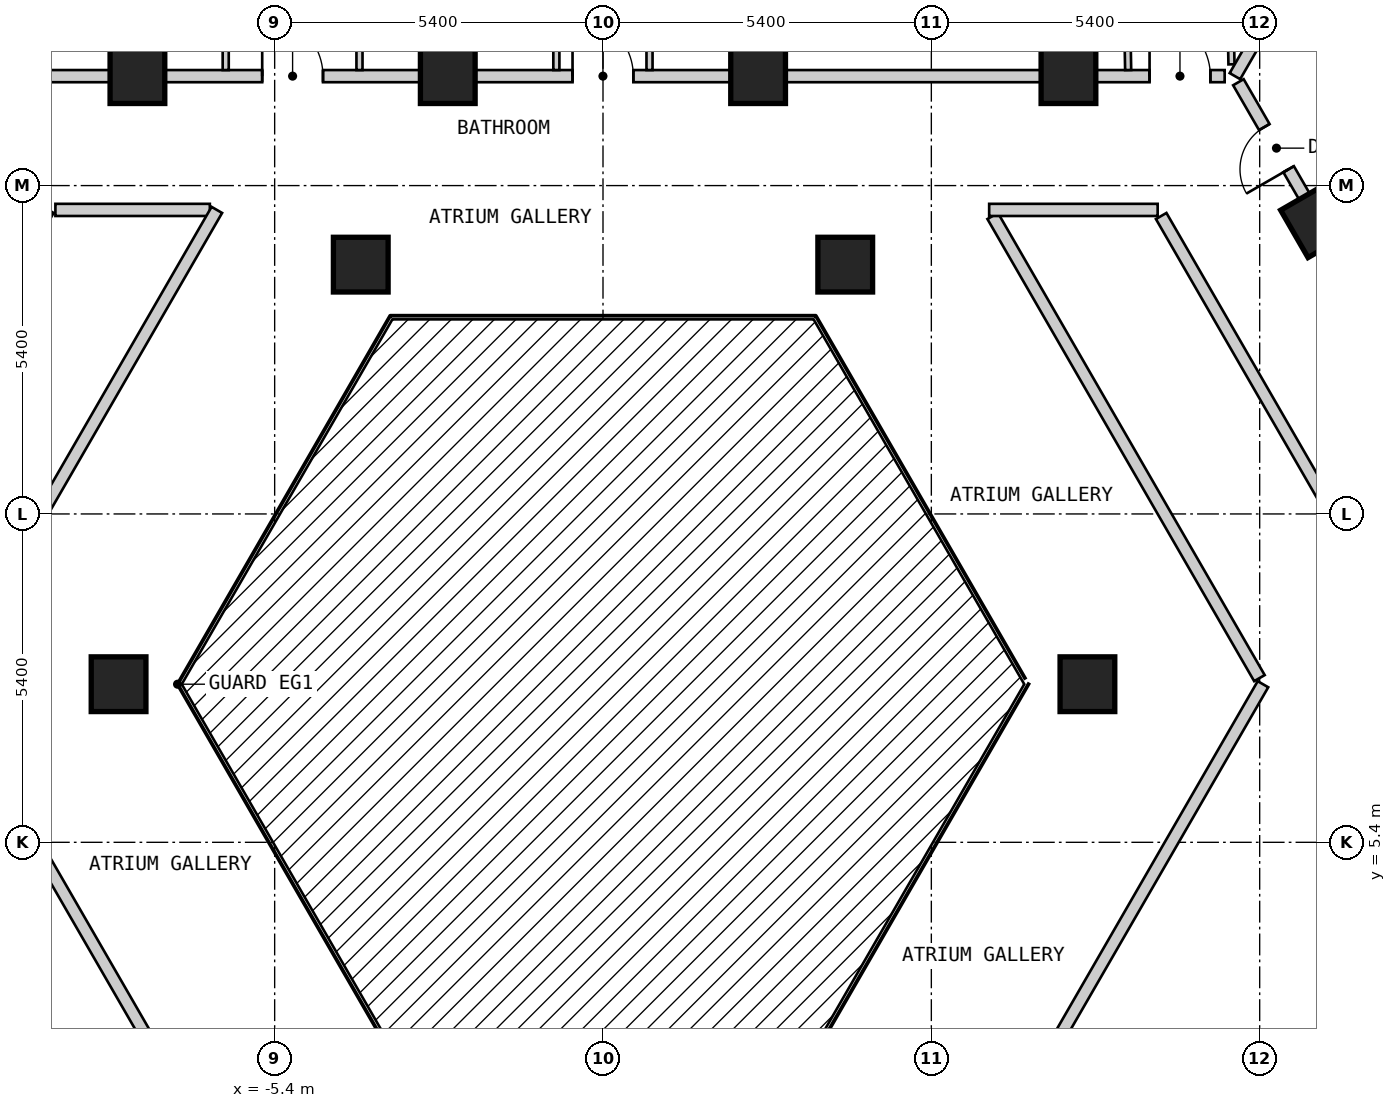
"""IFC4 building model, lengths in metres.
Left out: names, types, materials, properties, quantities, classifications, styles, units other than length and angle.
Written with IfcOpenShell. Run it as: python <this file> out.ifc"""

import sys

from ifc_helpers import new_model, si_unit, direction, frame, frame_2d, origin, origin_2d, place, context, subcontext, project, spatial, rectangle, extrude, element, fill, save


model = new_model("IFC4")
c1 = context("Model", 3, precision=1e-05, world=origin(), true_north=direction((0.0, 1.0)))
c2 = subcontext(c1, "Body", "Model", "MODEL_VIEW")
j1 = project(units=[si_unit("LENGTHUNIT", "METRE"), si_unit("PLANEANGLEUNIT", "RADIAN")], contexts=[c1])
p1 = place(None, origin())
s1 = spatial("IfcSite", under=j1, at=p1, CompositionType="ELEMENT")
p2 = place(p1, origin())
s2 = spatial("IfcBuilding", under=s1, at=p2, CompositionType="ELEMENT")
p3 = place(p2, frame((0.0, 0.0, 26.4)))
s3 = spatial("IfcBuildingStorey", under=s2, at=p3, CompositionType="ELEMENT", Elevation=26.4)
for number, where, z_axis, x_axis in (
    (1, (7.967, 8.0, 0.0), (0.0, 0.0, 1.0), (1.0, 0.0, 0.0)),
    (2, (11.76, 15.631, 0.0), (0.0, 0.0, 1.0), (-0.5, 0.866, 0.0)),
    (3, (7.655, 18.0, 0.0), (0.0, 0.0, 1.0), (-1.0, 0.0, 0.0)),
    (4, (3.984, 14.9, 0.0), (0.0, 0.0, 1.0), (1.0, 0.0, 0.0)),
    (5, (2.551, 18.0, 0.0), (0.0, 0.0, 1.0), (-1.0, 0.0, 0.0)),
    (6, (-2.553, 18.0, 0.0), (0.0, 0.0, 1.0), (-1.0, 0.0, 0.0)),
    (7, (-3.984, 14.9, 0.0), (0.0, 0.0, 1.0), (1.0, 0.0, 0.0)),
    (8, (-7.657, 18.0, 0.0), (0.0, 0.0, 1.0), (-1.0, 0.0, 0.0)),
    (9, (-7.967, 8.0, 0.0), (0.0, 0.0, 1.0), (1.0, 0.0, 0.0)),
):
    element("IfcColumn", number, at=place(p3, frame(where, z_axis=z_axis, x_axis=x_axis)), inside=s3, PredefinedType="COLUMN", context=c2, shape_type="SweptSolid", body=[
        extrude(rectangle(XDim=0.9, YDim=0.9, at=origin_2d()), origin(), (0.0, 0.0, 1.0), 3.0),
    ])
p4 = place(p3, frame((-10.796, 7.9, 0.0), z_axis=(0.0, 0.0, 1.0), x_axis=(0.499954271211, -0.866051803703, 0.0)))
e10 = element("IfcWall", 10, at=p4, inside=s3, PredefinedType="PARTITIONING", context=c2, shape_type="SweptSolid", body=[
    extrude(rectangle(XDim=7.536, YDim=0.2, at=frame_2d((3.768, 0.0))), origin(), (0.0, 0.0, 1.0), 2.7),
])
p5 = place(p3, frame((6.409, 15.7, 0.0), z_axis=(0.0, 0.0, 1.0), x_axis=(0.499930377127, -0.866065596838, 0.0)))
e11 = element("IfcWall", 11, at=p5, inside=s3, PredefinedType="PARTITIONING", context=c2, shape_type="SweptSolid", body=[
    extrude(rectangle(XDim=8.775, YDim=0.2, at=frame_2d((4.388, 0.0))), origin(), (0.0, 0.0, 1.0), 2.7),
])
p6 = place(p3, frame((9.18, 15.7, 0.0), z_axis=(0.0, 0.0, 1.0), x_axis=(0.500003652032, -0.866023295272, 0.0)))
e12 = element("IfcWall", 12, at=p6, inside=s3, PredefinedType="PARTITIONING", context=c2, shape_type="SweptSolid", body=[
    extrude(rectangle(XDim=18.012, YDim=0.2, at=frame_2d((9.006, 0.0))), origin(), (0.0, 0.0, 1.0), 2.7),
])
p7 = place(p6, frame((8.556, 0.0, 0.0)))
e13 = element("IfcOpeningElement", 13, at=p7, cuts=e12, PredefinedType="OPENING", context=c2, shape_type="SweptSolid", body=[
    extrude(rectangle(XDim=0.9, YDim=2.1, at=frame_2d((0.45, 1.05))), frame((0.0, 0.11, 0.0), z_axis=(0.0, -1.0, 0.0), x_axis=(1.0, 0.0, 0.0)), (0.0, 0.0, 1.0), 0.22),
])
p8 = place(p3, frame((10.45, 17.9, 0.0), z_axis=(0.0, 0.0, 1.0), x_axis=(0.500034352617, -0.866005569383, 0.0)))
e14 = element("IfcWall", 14, at=p8, inside=s3, PredefinedType="PARTITIONING", context=c2, shape_type="SweptSolid", body=[
    extrude(rectangle(XDim=20.553, YDim=0.2, at=frame_2d((10.276, 0.0))), origin(), (0.0, 0.0, 1.0), 2.7),
])
p9 = place(p8, frame((9.775, 0.0, 0.0)))
e15 = element("IfcOpeningElement", 15, at=p9, cuts=e14, PredefinedType="OPENING", context=c2, shape_type="SweptSolid", body=[
    extrude(rectangle(XDim=1.0, YDim=2.1, at=frame_2d((0.5, 1.05))), frame((0.0, 0.11, 0.0), z_axis=(0.0, -1.0, 0.0), x_axis=(1.0, 0.0, 0.0)), (0.0, 0.0, 1.0), 0.22),
])
p10 = place(p8, frame((0.852, 0.0, 0.0)))
e16 = element("IfcOpeningElement", 16, at=p10, cuts=e14, PredefinedType="OPENING", context=c2, shape_type="SweptSolid", body=[
    extrude(rectangle(XDim=0.8, YDim=2.1, at=frame_2d((0.4, 1.05))), frame((0.0, 0.11, 0.0), z_axis=(0.0, -1.0, 0.0), x_axis=(1.0, 0.0, 0.0)), (0.0, 0.0, 1.0), 0.22),
])
p11 = place(p3, frame((-9.006, 15.8, 0.0), z_axis=(0.0, 0.0, 1.0), x_axis=(1.0, 0.0, 0.0)))
e17 = element("IfcWall", 17, at=p11, inside=s3, PredefinedType="PARTITIONING", context=c2, shape_type="SweptSolid", body=[
    extrude(rectangle(XDim=2.54, YDim=0.2, at=frame_2d((1.27, 0.0))), origin(), (0.0, 0.0, 1.0), 2.7),
])
p12 = place(p3, frame((6.351, 15.8, 0.0), z_axis=(0.0, 0.0, 1.0), x_axis=(1.0, 0.0, 0.0)))
e18 = element("IfcWall", 18, at=p12, inside=s3, PredefinedType="PARTITIONING", context=c2, shape_type="SweptSolid", body=[
    extrude(rectangle(XDim=2.771, YDim=0.2, at=frame_2d((1.385, 0.0))), origin(), (0.0, 0.0, 1.0), 2.7),
])
p13 = place(p3, frame((-10.276, 18.0, 0.0), z_axis=(0.0, 0.0, 1.0), x_axis=(1.0, 0.0, 0.0)))
e19 = element("IfcWall", 19, at=p13, inside=s3, PredefinedType="PARTITIONING", context=c2, shape_type="SweptSolid", body=[
    extrude(rectangle(XDim=20.5, YDim=0.2, at=frame_2d((10.25, 0.0))), origin(), (0.0, 0.0, 1.0), 2.7),
])
p14 = place(p13, frame((19.265, 0.0, 0.0)))
e20 = element("IfcOpeningElement", 20, at=p14, cuts=e19, PredefinedType="OPENING", context=c2, shape_type="SweptSolid", body=[
    extrude(rectangle(XDim=1.0, YDim=2.1, at=frame_2d((0.5, 1.05))), frame((0.0, 0.11, 0.0), z_axis=(0.0, -1.0, 0.0), x_axis=(1.0, 0.0, 0.0)), (0.0, 0.0, 1.0), 0.22),
])
p15 = place(p13, frame((9.775, 0.0, 0.0)))
e21 = element("IfcOpeningElement", 21, at=p15, cuts=e19, PredefinedType="OPENING", context=c2, shape_type="SweptSolid", body=[
    extrude(rectangle(XDim=1.0, YDim=2.1, at=frame_2d((0.5, 1.05))), frame((0.0, 0.11, 0.0), z_axis=(0.0, -1.0, 0.0), x_axis=(1.0, 0.0, 0.0)), (0.0, 0.0, 1.0), 0.22),
])
p16 = place(p13, frame((4.671, 0.0, 0.0)))
e22 = element("IfcOpeningElement", 22, at=p16, cuts=e19, PredefinedType="OPENING", context=c2, shape_type="SweptSolid", body=[
    extrude(rectangle(XDim=1.0, YDim=2.1, at=frame_2d((0.5, 1.05))), frame((0.0, 0.11, 0.0), z_axis=(0.0, -1.0, 0.0), x_axis=(1.0, 0.0, 0.0)), (0.0, 0.0, 1.0), 0.22),
])
p17 = place(p3, frame((7.028, 1.373, 0.0), z_axis=(0.0, 0.0, 1.0), x_axis=(0.49998574534, 0.86603363356, 0.0)))
e23 = element("IfcWall", 23, at=p17, inside=s3, PredefinedType="PARTITIONING", context=c2, shape_type="SweptSolid", body=[
    extrude(rectangle(XDim=7.652, YDim=0.2, at=frame_2d((3.826, 0.0))), origin(), (0.0, 0.0, 1.0), 2.7),
])
p18 = place(p3, frame((-10.854, 8.0, 0.0), z_axis=(0.0, 0.0, 1.0), x_axis=(0.499964141897, 0.86604610548, 0.0)))
e24 = element("IfcWall", 24, at=p18, inside=s3, PredefinedType="PARTITIONING", context=c2, shape_type="SweptSolid", body=[
    extrude(rectangle(XDim=9.007, YDim=0.2, at=frame_2d((4.503, 0.0))), origin(), (0.0, 0.0, 1.0), 2.7),
])
p19 = place(p3, frame((-18.244, -0.001, 0.0), z_axis=(0.0, 0.0, 1.0), x_axis=(0.499962999376, 0.866046765051, 0.0)))
e25 = element("IfcWall", 25, at=p19, inside=s3, PredefinedType="PARTITIONING", context=c2, shape_type="SweptSolid", body=[
    extrude(rectangle(XDim=18.245, YDim=0.2, at=frame_2d((9.123, 0.0))), origin(), (0.0, 0.0, 1.0), 2.7),
])
p20 = place(p19, frame((8.672, 0.0, 0.0)))
e26 = element("IfcOpeningElement", 26, at=p20, cuts=e25, PredefinedType="OPENING", context=c2, shape_type="SweptSolid", body=[
    extrude(rectangle(XDim=0.9, YDim=2.1, at=frame_2d((0.45, 1.05))), frame((0.0, 0.11, 0.0), z_axis=(0.0, -1.0, 0.0), x_axis=(1.0, 0.0, 0.0)), (0.0, 0.0, 1.0), 0.22),
])
p21 = place(p3, frame((8.562, 22.15, 0.0), z_axis=(0.0, 0.0, 1.0), x_axis=(0.018504185939, -0.999828782894, 0.0)))
e27 = element("IfcWall", 27, at=p21, inside=s3, PredefinedType="PARTITIONING", context=c2, shape_type="SweptSolid", body=[
    extrude(rectangle(XDim=4.051, YDim=0.1, at=frame_2d((2.025, 0.0))), origin(), (0.0, 0.0, 1.0), 2.7),
])
p22 = place(p21, frame((1.65, 0.0, 0.0)))
e28 = element("IfcOpeningElement", 28, at=p22, cuts=e27, PredefinedType="OPENING", context=c2, shape_type="SweptSolid", body=[
    extrude(rectangle(XDim=0.8, YDim=2.1, at=frame_2d((0.4, 1.05))), frame((0.0, 0.06, 0.0), z_axis=(0.0, -1.0, 0.0), x_axis=(1.0, 0.0, 0.0)), (0.0, 0.0, 1.0), 0.12),
])
p23 = place(p3, frame((10.262, 22.15, 0.0), z_axis=(0.0, 0.0, 1.0), x_axis=(0.018696971826, -0.999825196344, 0.0)))
e29 = element("IfcWall", 29, at=p23, inside=s3, PredefinedType="PARTITIONING", context=c2, shape_type="SweptSolid", body=[
    extrude(rectangle(XDim=3.957, YDim=0.1, at=frame_2d((1.978, 0.0))), origin(), (0.0, 0.0, 1.0), 2.7),
])
p24 = place(p23, frame((1.6, 0.0, 0.0)))
e30 = element("IfcOpeningElement", 30, at=p24, cuts=e29, PredefinedType="OPENING", context=c2, shape_type="SweptSolid", body=[
    extrude(rectangle(XDim=0.9, YDim=2.1, at=frame_2d((0.45, 1.05))), frame((0.0, 0.06, 0.0), z_axis=(0.0, -1.0, 0.0), x_axis=(1.0, 0.0, 0.0)), (0.0, 0.0, 1.0), 0.12),
])
p25 = place(p3, frame((0.765, 20.609, 0.0), z_axis=(0.0, 0.0, 1.0), x_axis=(0.0, -1.0, 0.0)))
e31 = element("IfcWall", 31, at=p25, inside=s3, PredefinedType="PARTITIONING", context=c2, shape_type="SweptSolid", body=[
    extrude(rectangle(XDim=2.509, YDim=0.1, at=frame_2d((1.254, 0.0))), origin(), (0.0, 0.0, 1.0), 2.7),
])
p26 = place(p25, frame((0.829, 0.0, 0.0)))
e32 = element("IfcOpeningElement", 32, at=p26, cuts=e31, PredefinedType="OPENING", context=c2, shape_type="SweptSolid", body=[
    extrude(rectangle(XDim=0.9, YDim=2.1, at=frame_2d((0.45, 1.05))), frame((0.0, 0.06, 0.0), z_axis=(0.0, -1.0, 0.0), x_axis=(1.0, 0.0, 0.0)), (0.0, 0.0, 1.0), 0.12),
])
p27 = place(p3, frame((2.551, 18.1, 0.0), z_axis=(0.0, 0.0, 1.0), x_axis=(0.0, 1.0, 0.0)))
e33 = element("IfcWall", 33, at=p27, inside=s3, PredefinedType="PARTITIONING", context=c2, shape_type="SweptSolid", body=[
    extrude(rectangle(XDim=3.5, YDim=0.1, at=frame_2d((1.75, 0.0))), origin(), (0.0, 0.0, 1.0), 2.7),
])
p28 = place(p3, frame((-4.005, 18.1, 0.0), z_axis=(0.0, 0.0, 1.0), x_axis=(0.0, 1.0, 0.0)))
e34 = element("IfcWall", 34, at=p28, inside=s3, PredefinedType="PARTITIONING", context=c2, shape_type="SweptSolid", body=[
    extrude(rectangle(XDim=4.05, YDim=0.1, at=frame_2d((2.025, 0.0))), origin(), (0.0, 0.0, 1.0), 2.7),
])
p29 = place(p28, frame((1.6, 0.0, 0.0)))
e35 = element("IfcOpeningElement", 35, at=p29, cuts=e34, PredefinedType="OPENING", context=c2, shape_type="SweptSolid", body=[
    extrude(rectangle(XDim=0.8, YDim=2.1, at=frame_2d((0.4, 1.05))), frame((0.0, 0.06, 0.0), z_axis=(0.0, -1.0, 0.0), x_axis=(1.0, 0.0, 0.0)), (0.0, 0.0, 1.0), 0.12),
])
p30 = place(p3, frame((-6.205, 18.1, 0.0), z_axis=(0.0, 0.0, 1.0), x_axis=(0.0, 1.0, 0.0)))
e36 = element("IfcWall", 36, at=p30, inside=s3, PredefinedType="PARTITIONING", context=c2, shape_type="SweptSolid", body=[
    extrude(rectangle(XDim=4.05, YDim=0.1, at=frame_2d((2.025, 0.0))), origin(), (0.0, 0.0, 1.0), 2.7),
])
p31 = place(p30, frame((1.55, 0.0, 0.0)))
e37 = element("IfcOpeningElement", 37, at=p31, cuts=e36, PredefinedType="OPENING", context=c2, shape_type="SweptSolid", body=[
    extrude(rectangle(XDim=0.9, YDim=2.1, at=frame_2d((0.45, 1.05))), frame((0.0, 0.06, 0.0), z_axis=(0.0, -1.0, 0.0), x_axis=(1.0, 0.0, 0.0)), (0.0, 0.0, 1.0), 0.12),
])
p32 = place(p3, frame((-7.657, 18.1, 0.0), z_axis=(0.0, 0.0, 1.0), x_axis=(0.0, 1.0, 0.0)))
e38 = element("IfcWall", 38, at=p32, inside=s3, PredefinedType="PARTITIONING", context=c2, shape_type="SweptSolid", body=[
    extrude(rectangle(XDim=4.1, YDim=0.1, at=frame_2d((2.05, 0.0))), origin(), (0.0, 0.0, 1.0), 2.7),
])
p33 = place(p3, frame((-0.767, 18.1, 0.0), z_axis=(0.0, 0.0, 1.0), x_axis=(0.0, 1.0, 0.0)))
e39 = element("IfcWall", 39, at=p33, inside=s3, PredefinedType="PARTITIONING", context=c2, shape_type="SweptSolid", body=[
    extrude(rectangle(XDim=2.51, YDim=0.1, at=frame_2d((1.255, 0.0))), origin(), (0.0, 0.0, 1.0), 2.7),
])
p34 = place(p33, frame((0.83, 0.0, 0.0)))
e40 = element("IfcOpeningElement", 40, at=p34, cuts=e39, PredefinedType="OPENING", context=c2, shape_type="SweptSolid", body=[
    extrude(rectangle(XDim=0.8, YDim=2.1, at=frame_2d((0.4, 1.05))), frame((0.0, 0.06, 0.0), z_axis=(0.0, -1.0, 0.0), x_axis=(1.0, 0.0, 0.0)), (0.0, 0.0, 1.0), 0.12),
])
p35 = place(p3, frame((7.655, 21.62, 0.0), z_axis=(0.0, 0.0, 1.0), x_axis=(0.0, -1.0, 0.0)))
e41 = element("IfcWall", 41, at=p35, inside=s3, PredefinedType="PARTITIONING", context=c2, shape_type="SweptSolid", body=[
    extrude(rectangle(XDim=3.52, YDim=0.2, at=frame_2d((1.76, 0.0))), origin(), (0.0, 0.0, 1.0), 2.7),
])
p36 = place(p3, frame((10.393, 18.0, 0.0), z_axis=(0.0, 0.0, 1.0), x_axis=(0.499945497007, 0.866056868816, 0.0)))
e42 = element("IfcWall", 42, at=p36, inside=s3, PredefinedType="PARTITIONING", context=c2, shape_type="SweptSolid", body=[
    extrude(rectangle(XDim=10.265, YDim=0.2, at=frame_2d((5.132, 0.0))), origin(), (0.0, 0.0, 1.0), 2.7),
])
p37 = place(p3, frame((-2.553, 18.1, 0.0), z_axis=(0.0, 0.0, 1.0), x_axis=(0.0, 1.0, 0.0)))
e43 = element("IfcWall", 43, at=p37, inside=s3, PredefinedType="PARTITIONING", context=c2, shape_type="SweptSolid", body=[
    extrude(rectangle(XDim=2.56, YDim=0.2, at=frame_2d((1.28, 0.0))), origin(), (0.0, 0.0, 1.0), 2.7),
])
p38 = place(p10, origin())
e44 = element("IfcDoor", 44, at=p38, inside=s3, OperationType="SINGLE_SWING_RIGHT", PredefinedType="DOOR", context=c2, shape_type="SweptSolid", body=[
    extrude(rectangle(XDim=0.8, YDim=2.1, at=frame_2d((0.4, 1.05))), frame((0.0, 0.025, 0.0), z_axis=(0.0, -1.0, 0.0), x_axis=(1.0, 0.0, 0.0)), (0.0, 0.0, 1.0), 0.05),
])
fill(e16, e44)
p39 = place(p14, origin())
e45 = element("IfcDoor", 45, at=p39, inside=s3, OperationType="SINGLE_SWING_LEFT", PredefinedType="DOOR", context=c2, shape_type="SweptSolid", body=[
    extrude(rectangle(XDim=1.0, YDim=2.1, at=frame_2d((0.5, 1.05))), frame((0.0, 0.025, 0.0), z_axis=(0.0, -1.0, 0.0), x_axis=(1.0, 0.0, 0.0)), (0.0, 0.0, 1.0), 0.05),
])
fill(e20, e45)
p40 = place(p15, origin())
e46 = element("IfcDoor", 46, at=p40, inside=s3, OperationType="SINGLE_SWING_LEFT", PredefinedType="DOOR", context=c2, shape_type="SweptSolid", body=[
    extrude(rectangle(XDim=1.0, YDim=2.1, at=frame_2d((0.5, 1.05))), frame((0.0, 0.025, 0.0), z_axis=(0.0, -1.0, 0.0), x_axis=(1.0, 0.0, 0.0)), (0.0, 0.0, 1.0), 0.05),
])
fill(e21, e46)
p41 = place(p16, origin())
e47 = element("IfcDoor", 47, at=p41, inside=s3, OperationType="SINGLE_SWING_LEFT", PredefinedType="DOOR", context=c2, shape_type="SweptSolid", body=[
    extrude(rectangle(XDim=1.0, YDim=2.1, at=frame_2d((0.5, 1.05))), frame((0.0, 0.025, 0.0), z_axis=(0.0, -1.0, 0.0), x_axis=(1.0, 0.0, 0.0)), (0.0, 0.0, 1.0), 0.05),
])
fill(e22, e47)
save(model, sys.argv[1])
